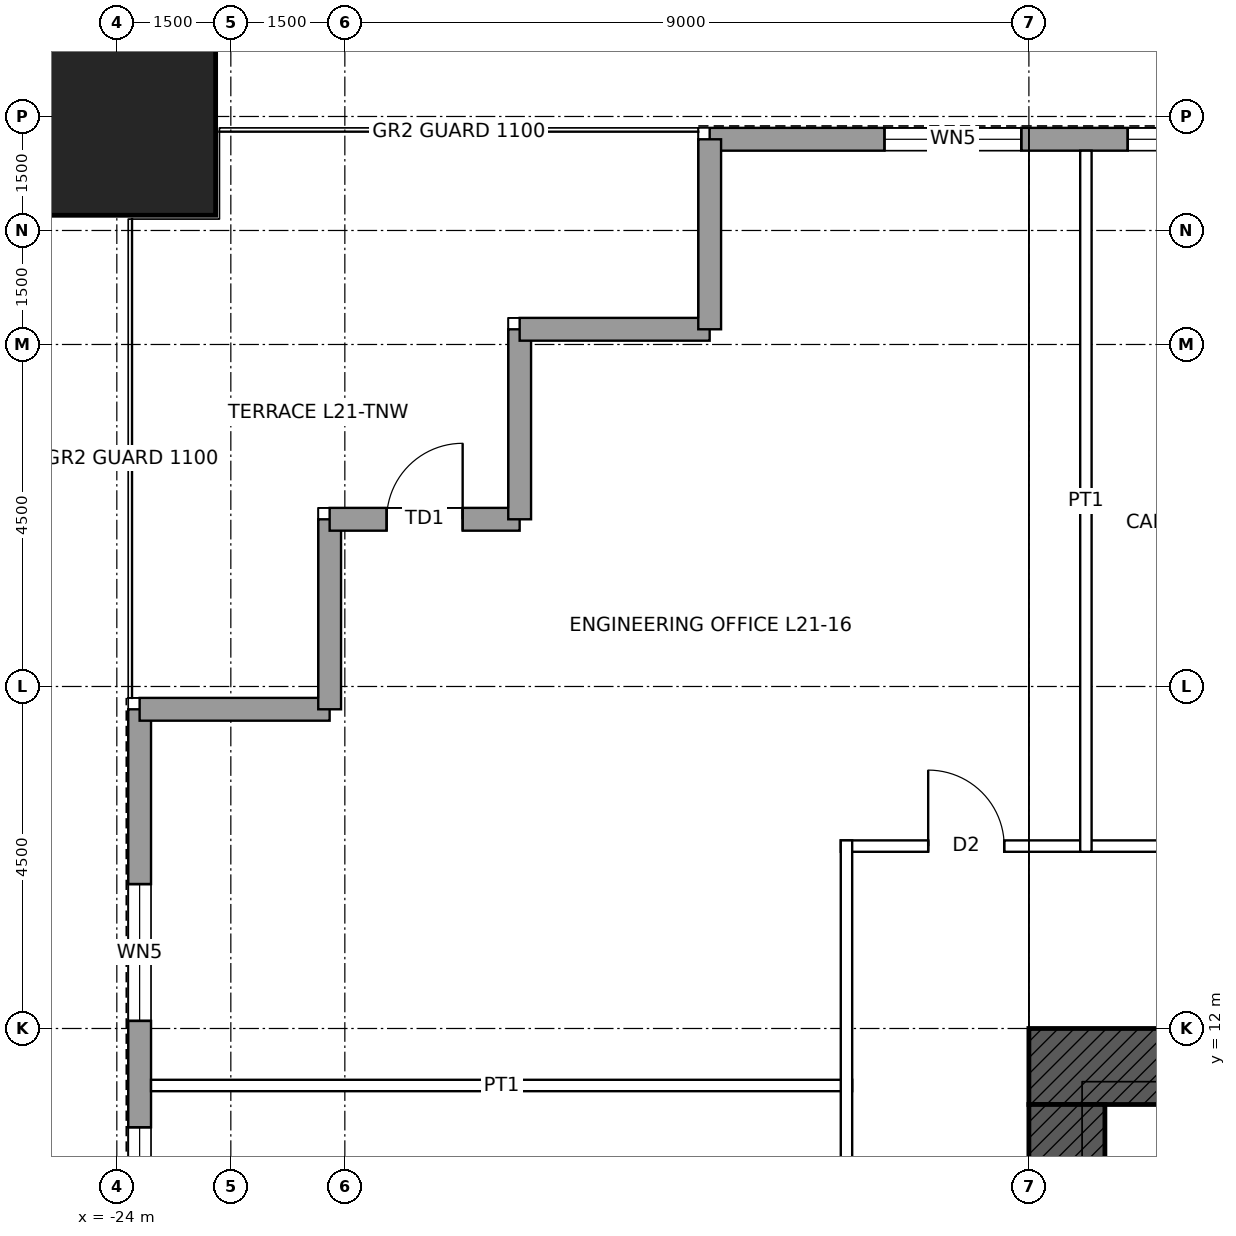
"""IFC4 building model, lengths in metres.
Left out: names, types, materials, properties, quantities, classifications, styles, units other than length and angle.
Written with IfcOpenShell. Run it as: python <this file> out.ifc"""

import sys

from ifc_helpers import new_model, si_unit, direction, frame, frame_2d, origin, origin_2d, place, context, subcontext, project, spatial, rectangle, hollow_rectangle, extrude, element, fill, save


model = new_model("IFC4")
c1 = context("Model", 3, precision=1e-05, world=origin(), true_north=direction((0.0, 1.0)))
c2 = subcontext(c1, "Body", "Model", "MODEL_VIEW")
j1 = project(units=[si_unit("LENGTHUNIT", "METRE"), si_unit("PLANEANGLEUNIT", "RADIAN")], contexts=[c1])
p1 = place(None, origin())
s1 = spatial("IfcSite", under=j1, at=p1, CompositionType="ELEMENT")
p2 = place(p1, origin())
s2 = spatial("IfcBuilding", under=s1, at=p2, CompositionType="ELEMENT")
p3 = place(p2, frame((0.0, 0.0, 108.9)))
s3 = spatial("IfcBuildingStorey", under=s2, at=p3, CompositionType="ELEMENT", Elevation=108.9)
p4 = place(p3, frame((-24.0, 24.0, 0.0), z_axis=(0.0, 0.0, 1.0), x_axis=(1.0, 0.0, 0.0)))
e1 = element("IfcColumn", 1, at=p4, inside=s3, PredefinedType="COLUMN", context=c2, shape_type="SweptSolid", body=[
    extrude(hollow_rectangle(XDim=2.6, YDim=2.6, WallThickness=0.13, at=origin_2d()), origin(), (0.0, 0.0, 1.0), 4.5),
])
p5 = place(p3, frame((-12.0, 11.5, 0.0), z_axis=(0.0, 0.0, 1.0), x_axis=(1.0, 0.0, 0.0)))
e2 = element("IfcWall", 2, at=p5, inside=s3, PredefinedType="SHEAR", context=c2, shape_type="SweptSolid", body=[
    extrude(rectangle(XDim=24.0, YDim=1.0, at=frame_2d((12.0, 0.0))), origin(), (0.0, 0.0, 1.0), 4.5),
])
p6 = place(p5, frame((6.25, 0.0, 0.0)))
e3 = element("IfcOpeningElement", 3, at=p6, cuts=e2, PredefinedType="OPENING", context=c2, shape_type="SweptSolid", body=[
    extrude(rectangle(XDim=1.0, YDim=2.4, at=frame_2d((0.5, 1.2))), frame((0.0, 0.51, 0.0), z_axis=(0.0, -1.0, 0.0), x_axis=(1.0, 0.0, 0.0)), (0.0, 0.0, 1.0), 1.02),
])
p7 = place(p5, frame((16.75, 0.0, 0.0)))
e4 = element("IfcOpeningElement", 4, at=p7, cuts=e2, PredefinedType="OPENING", context=c2, shape_type="SweptSolid", body=[
    extrude(rectangle(XDim=1.0, YDim=2.4, at=frame_2d((0.5, 1.2))), frame((0.0, 0.51, 0.0), z_axis=(0.0, -1.0, 0.0), x_axis=(1.0, 0.0, 0.0)), (0.0, 0.0, 1.0), 1.02),
])
p8 = place(p3, frame((-11.5, -11.0, 0.0), z_axis=(0.0, 0.0, 1.0), x_axis=(0.0, 1.0, 0.0)))
e5 = element("IfcWall", 5, at=p8, inside=s3, PredefinedType="SHEAR", context=c2, shape_type="SweptSolid", body=[
    extrude(rectangle(XDim=22.0, YDim=1.0, at=frame_2d((11.0, 0.0))), origin(), (0.0, 0.0, 1.0), 4.5),
])
p9 = place(p8, frame((10.5, 0.0, 0.0)))
e6 = element("IfcOpeningElement", 6, at=p9, cuts=e5, PredefinedType="OPENING", context=c2, shape_type="SweptSolid", body=[
    extrude(rectangle(XDim=1.0, YDim=2.4, at=frame_2d((0.5, 1.2))), frame((0.0, 0.51, 0.0), z_axis=(0.0, -1.0, 0.0), x_axis=(1.0, 0.0, 0.0)), (0.0, 0.0, 1.0), 1.02),
])
p10 = place(p3, frame((-16.2, 23.7, 0.0), z_axis=(0.0, 0.0, 1.0), x_axis=(1.0, 0.0, 0.0)))
e7 = element("IfcWall", 7, at=p10, inside=s3, PredefinedType="SOLIDWALL", context=c2, shape_type="SweptSolid", body=[
    extrude(rectangle(XDim=32.4, YDim=0.3, at=frame_2d((16.2, 0.0))), origin(), (0.0, 0.0, 1.0), 4.3),
])
p11 = place(p10, frame((2.3, 0.0, 1.0)))
e8 = element("IfcOpeningElement", 8, at=p11, cuts=e7, PredefinedType="OPENING", context=c2, shape_type="SweptSolid", body=[
    extrude(rectangle(XDim=1.8, YDim=1.2, at=frame_2d((0.9, 0.6))), frame((0.0, 0.16, 0.0), z_axis=(0.0, -1.0, 0.0), x_axis=(1.0, 0.0, 0.0)), (0.0, 0.0, 1.0), 0.32),
])
p12 = place(p10, frame((5.5, 0.0, 1.0)))
e9 = element("IfcOpeningElement", 9, at=p12, cuts=e7, PredefinedType="OPENING", context=c2, shape_type="SweptSolid", body=[
    extrude(rectangle(XDim=2.4, YDim=1.2, at=frame_2d((1.2, 0.6))), frame((0.0, 0.16, 0.0), z_axis=(0.0, -1.0, 0.0), x_axis=(1.0, 0.0, 0.0)), (0.0, 0.0, 1.0), 0.32),
])
p13 = place(p10, frame((9.5, 0.0, 1.0)))
e10 = element("IfcOpeningElement", 10, at=p13, cuts=e7, PredefinedType="OPENING", context=c2, shape_type="SweptSolid", body=[
    extrude(rectangle(XDim=2.4, YDim=1.2, at=frame_2d((1.2, 0.6))), frame((0.0, 0.16, 0.0), z_axis=(0.0, -1.0, 0.0), x_axis=(1.0, 0.0, 0.0)), (0.0, 0.0, 1.0), 0.32),
])
p14 = place(p10, frame((13.0, 0.0, 1.0)))
e11 = element("IfcOpeningElement", 11, at=p14, cuts=e7, PredefinedType="OPENING", context=c2, shape_type="SweptSolid", body=[
    extrude(rectangle(XDim=2.4, YDim=1.2, at=frame_2d((1.2, 0.6))), frame((0.0, 0.16, 0.0), z_axis=(0.0, -1.0, 0.0), x_axis=(1.0, 0.0, 0.0)), (0.0, 0.0, 1.0), 0.32),
])
p15 = place(p10, frame((17.0, 0.0, 1.0)))
e12 = element("IfcOpeningElement", 12, at=p15, cuts=e7, PredefinedType="OPENING", context=c2, shape_type="SweptSolid", body=[
    extrude(rectangle(XDim=2.4, YDim=1.2, at=frame_2d((1.2, 0.6))), frame((0.0, 0.16, 0.0), z_axis=(0.0, -1.0, 0.0), x_axis=(1.0, 0.0, 0.0)), (0.0, 0.0, 1.0), 0.32),
])
p16 = place(p10, frame((20.5, 0.0, 1.0)))
e13 = element("IfcOpeningElement", 13, at=p16, cuts=e7, PredefinedType="OPENING", context=c2, shape_type="SweptSolid", body=[
    extrude(rectangle(XDim=2.4, YDim=1.2, at=frame_2d((1.2, 0.6))), frame((0.0, 0.16, 0.0), z_axis=(0.0, -1.0, 0.0), x_axis=(1.0, 0.0, 0.0)), (0.0, 0.0, 1.0), 0.32),
])
p17 = place(p10, frame((24.5, 0.0, 1.0)))
e14 = element("IfcOpeningElement", 14, at=p17, cuts=e7, PredefinedType="OPENING", context=c2, shape_type="SweptSolid", body=[
    extrude(rectangle(XDim=2.4, YDim=1.2, at=frame_2d((1.2, 0.6))), frame((0.0, 0.16, 0.0), z_axis=(0.0, -1.0, 0.0), x_axis=(1.0, 0.0, 0.0)), (0.0, 0.0, 1.0), 0.32),
])
p18 = place(p10, frame((28.3, 0.0, 1.0)))
e15 = element("IfcOpeningElement", 15, at=p18, cuts=e7, PredefinedType="OPENING", context=c2, shape_type="SweptSolid", body=[
    extrude(rectangle(XDim=1.8, YDim=1.2, at=frame_2d((0.9, 0.6))), frame((0.0, 0.16, 0.0), z_axis=(0.0, -1.0, 0.0), x_axis=(1.0, 0.0, 0.0)), (0.0, 0.0, 1.0), 0.32),
])
p19 = place(p3, frame((-23.7, -16.2, 0.0), z_axis=(0.0, 0.0, 1.0), x_axis=(0.0, 1.0, 0.0)))
e16 = element("IfcWall", 16, at=p19, inside=s3, PredefinedType="SOLIDWALL", context=c2, shape_type="SweptSolid", body=[
    extrude(rectangle(XDim=32.4, YDim=0.3, at=frame_2d((16.2, 0.0))), origin(), (0.0, 0.0, 1.0), 4.3),
])
p20 = place(p19, frame((2.3, 0.0, 1.0)))
e17 = element("IfcOpeningElement", 17, at=p20, cuts=e16, PredefinedType="OPENING", context=c2, shape_type="SweptSolid", body=[
    extrude(rectangle(XDim=1.8, YDim=1.2, at=frame_2d((0.9, 0.6))), frame((0.0, 0.16, 0.0), z_axis=(0.0, -1.0, 0.0), x_axis=(1.0, 0.0, 0.0)), (0.0, 0.0, 1.0), 0.32),
])
p21 = place(p19, frame((5.5, 0.0, 1.0)))
e18 = element("IfcOpeningElement", 18, at=p21, cuts=e16, PredefinedType="OPENING", context=c2, shape_type="SweptSolid", body=[
    extrude(rectangle(XDim=2.4, YDim=1.2, at=frame_2d((1.2, 0.6))), frame((0.0, 0.16, 0.0), z_axis=(0.0, -1.0, 0.0), x_axis=(1.0, 0.0, 0.0)), (0.0, 0.0, 1.0), 0.32),
])
p22 = place(p19, frame((9.5, 0.0, 1.0)))
e19 = element("IfcOpeningElement", 19, at=p22, cuts=e16, PredefinedType="OPENING", context=c2, shape_type="SweptSolid", body=[
    extrude(rectangle(XDim=2.4, YDim=1.2, at=frame_2d((1.2, 0.6))), frame((0.0, 0.16, 0.0), z_axis=(0.0, -1.0, 0.0), x_axis=(1.0, 0.0, 0.0)), (0.0, 0.0, 1.0), 0.32),
])
p23 = place(p19, frame((13.0, 0.0, 1.0)))
e20 = element("IfcOpeningElement", 20, at=p23, cuts=e16, PredefinedType="OPENING", context=c2, shape_type="SweptSolid", body=[
    extrude(rectangle(XDim=2.4, YDim=1.2, at=frame_2d((1.2, 0.6))), frame((0.0, 0.16, 0.0), z_axis=(0.0, -1.0, 0.0), x_axis=(1.0, 0.0, 0.0)), (0.0, 0.0, 1.0), 0.32),
])
p24 = place(p19, frame((17.0, 0.0, 1.0)))
e21 = element("IfcOpeningElement", 21, at=p24, cuts=e16, PredefinedType="OPENING", context=c2, shape_type="SweptSolid", body=[
    extrude(rectangle(XDim=2.4, YDim=1.2, at=frame_2d((1.2, 0.6))), frame((0.0, 0.16, 0.0), z_axis=(0.0, -1.0, 0.0), x_axis=(1.0, 0.0, 0.0)), (0.0, 0.0, 1.0), 0.32),
])
p25 = place(p19, frame((20.5, 0.0, 1.0)))
e22 = element("IfcOpeningElement", 22, at=p25, cuts=e16, PredefinedType="OPENING", context=c2, shape_type="SweptSolid", body=[
    extrude(rectangle(XDim=2.4, YDim=1.2, at=frame_2d((1.2, 0.6))), frame((0.0, 0.16, 0.0), z_axis=(0.0, -1.0, 0.0), x_axis=(1.0, 0.0, 0.0)), (0.0, 0.0, 1.0), 0.32),
])
p26 = place(p19, frame((24.5, 0.0, 1.0)))
e23 = element("IfcOpeningElement", 23, at=p26, cuts=e16, PredefinedType="OPENING", context=c2, shape_type="SweptSolid", body=[
    extrude(rectangle(XDim=2.4, YDim=1.2, at=frame_2d((1.2, 0.6))), frame((0.0, 0.16, 0.0), z_axis=(0.0, -1.0, 0.0), x_axis=(1.0, 0.0, 0.0)), (0.0, 0.0, 1.0), 0.32),
])
p27 = place(p19, frame((28.3, 0.0, 1.0)))
e24 = element("IfcOpeningElement", 24, at=p27, cuts=e16, PredefinedType="OPENING", context=c2, shape_type="SweptSolid", body=[
    extrude(rectangle(XDim=1.8, YDim=1.2, at=frame_2d((0.9, 0.6))), frame((0.0, 0.16, 0.0), z_axis=(0.0, -1.0, 0.0), x_axis=(1.0, 0.0, 0.0)), (0.0, 0.0, 1.0), 0.32),
])
for number, where, z_axis, x_axis in (
    (25, (-23.7, 16.2, 0.0), (0.0, 0.0, 1.0), (1.0, 0.0, 0.0)),
    (26, (-21.2, 16.2, 0.0), (0.0, 0.0, 1.0), (0.0, 1.0, 0.0)),
):
    element("IfcWall", number, at=place(p3, frame(where, z_axis=z_axis, x_axis=x_axis)), inside=s3, PredefinedType="SOLIDWALL", context=c2, shape_type="SweptSolid", body=[
        extrude(rectangle(XDim=2.5, YDim=0.3, at=frame_2d((1.25, 0.0))), origin(), (0.0, 0.0, 1.0), 4.3),
    ])
p28 = place(p3, frame((-21.2, 18.7, 0.0), z_axis=(0.0, 0.0, 1.0), x_axis=(1.0, 0.0, 0.0)))
e27 = element("IfcWall", 27, at=p28, inside=s3, PredefinedType="SOLIDWALL", context=c2, shape_type="SweptSolid", body=[
    extrude(rectangle(XDim=2.5, YDim=0.3, at=frame_2d((1.25, 0.0))), origin(), (0.0, 0.0, 1.0), 4.3),
])
p29 = place(p28, frame((0.75, 0.0, 0.0)))
e28 = element("IfcOpeningElement", 28, at=p29, cuts=e27, PredefinedType="OPENING", context=c2, shape_type="SweptSolid", body=[
    extrude(rectangle(XDim=1.0, YDim=2.4, at=frame_2d((0.5, 1.2))), frame((0.0, 0.16, 0.0), z_axis=(0.0, -1.0, 0.0), x_axis=(1.0, 0.0, 0.0)), (0.0, 0.0, 1.0), 0.32),
])
for number, where, z_axis, x_axis in (
    (29, (-18.7, 18.7, 0.0), (0.0, 0.0, 1.0), (0.0, 1.0, 0.0)),
    (30, (-18.7, 21.2, 0.0), (0.0, 0.0, 1.0), (1.0, 0.0, 0.0)),
    (31, (-16.2, 21.2, 0.0), (0.0, 0.0, 1.0), (0.0, 1.0, 0.0)),
):
    element("IfcWall", number, at=place(p3, frame(where, z_axis=z_axis, x_axis=x_axis)), inside=s3, PredefinedType="SOLIDWALL", context=c2, shape_type="SweptSolid", body=[
        extrude(rectangle(XDim=2.5, YDim=0.3, at=frame_2d((1.25, 0.0))), origin(), (0.0, 0.0, 1.0), 4.3),
    ])
p30 = place(p3, frame((-23.55, 11.25, 0.0), z_axis=(0.0, 0.0, 1.0), x_axis=(1.0, 0.0, 0.0)))
e32 = element("IfcWall", 32, at=p30, inside=s3, PredefinedType="PARTITIONING", context=c2, shape_type="SweptSolid", body=[
    extrude(rectangle(XDim=9.225, YDim=0.15, at=frame_2d((4.613, 0.0))), origin(), (0.0, 0.0, 1.0), 3.431),
])
p31 = place(p3, frame((-14.475, 14.4, 0.0), z_axis=(0.0, 0.0, 1.0), x_axis=(1.0, 0.0, 0.0)))
e33 = element("IfcWall", 33, at=p31, inside=s3, PredefinedType="PARTITIONING", context=c2, shape_type="SweptSolid", body=[
    extrude(rectangle(XDim=28.95, YDim=0.15, at=frame_2d((14.475, 0.0))), origin(), (0.0, 0.0, 1.0), 4.3),
])
p32 = place(p31, frame((4.2, 0.0, 0.0)))
e34 = element("IfcOpeningElement", 34, at=p32, cuts=e33, PredefinedType="OPENING", context=c2, shape_type="SweptSolid", body=[
    extrude(rectangle(XDim=1.8, YDim=2.4, at=frame_2d((0.9, 1.2))), frame((0.0, 0.085, 0.0), z_axis=(0.0, -1.0, 0.0), x_axis=(1.0, 0.0, 0.0)), (0.0, 0.0, 1.0), 0.17),
])
p33 = place(p31, frame((9.825, 0.0, 0.0)))
e35 = element("IfcOpeningElement", 35, at=p33, cuts=e33, PredefinedType="OPENING", context=c2, shape_type="SweptSolid", body=[
    extrude(rectangle(XDim=1.8, YDim=2.4, at=frame_2d((0.9, 1.2))), frame((0.0, 0.085, 0.0), z_axis=(0.0, -1.0, 0.0), x_axis=(1.0, 0.0, 0.0)), (0.0, 0.0, 1.0), 0.17),
])
p34 = place(p31, frame((17.325, 0.0, 0.0)))
e36 = element("IfcOpeningElement", 36, at=p34, cuts=e33, PredefinedType="OPENING", context=c2, shape_type="SweptSolid", body=[
    extrude(rectangle(XDim=1.8, YDim=2.4, at=frame_2d((0.9, 1.2))), frame((0.0, 0.085, 0.0), z_axis=(0.0, -1.0, 0.0), x_axis=(1.0, 0.0, 0.0)), (0.0, 0.0, 1.0), 0.17),
])
p35 = place(p31, frame((22.95, 0.0, 0.0)))
e37 = element("IfcOpeningElement", 37, at=p35, cuts=e33, PredefinedType="OPENING", context=c2, shape_type="SweptSolid", body=[
    extrude(rectangle(XDim=1.8, YDim=2.4, at=frame_2d((0.9, 1.2))), frame((0.0, 0.085, 0.0), z_axis=(0.0, -1.0, 0.0), x_axis=(1.0, 0.0, 0.0)), (0.0, 0.0, 1.0), 0.17),
])
p36 = place(p31, frame((26.8, 0.0, 0.0)))
e38 = element("IfcOpeningElement", 38, at=p36, cuts=e33, PredefinedType="OPENING", context=c2, shape_type="SweptSolid", body=[
    extrude(rectangle(XDim=1.0, YDim=2.1, at=frame_2d((0.5, 1.05))), frame((0.0, 0.085, 0.0), z_axis=(0.0, -1.0, 0.0), x_axis=(1.0, 0.0, 0.0)), (0.0, 0.0, 1.0), 0.17),
])
p37 = place(p31, frame((1.15, 0.0, 0.0)))
e39 = element("IfcOpeningElement", 39, at=p37, cuts=e33, PredefinedType="OPENING", context=c2, shape_type="SweptSolid", body=[
    extrude(rectangle(XDim=1.0, YDim=2.1, at=frame_2d((0.5, 1.05))), frame((0.0, 0.085, 0.0), z_axis=(0.0, -1.0, 0.0), x_axis=(1.0, 0.0, 0.0)), (0.0, 0.0, 1.0), 0.17),
])
p38 = place(p3, frame((-14.4, -14.475, 0.0), z_axis=(0.0, 0.0, 1.0), x_axis=(0.0, 1.0, 0.0)))
e40 = element("IfcWall", 40, at=p38, inside=s3, PredefinedType="PARTITIONING", context=c2, shape_type="SweptSolid", body=[
    extrude(rectangle(XDim=28.95, YDim=0.15, at=frame_2d((14.475, 0.0))), origin(), (0.0, 0.0, 1.0), 4.3),
])
p39 = place(p38, frame((6.075, 0.0, 0.0)))
e41 = element("IfcOpeningElement", 41, at=p39, cuts=e40, PredefinedType="OPENING", context=c2, shape_type="SweptSolid", body=[
    extrude(rectangle(XDim=1.8, YDim=2.4, at=frame_2d((0.9, 1.2))), frame((0.0, 0.085, 0.0), z_axis=(0.0, -1.0, 0.0), x_axis=(1.0, 0.0, 0.0)), (0.0, 0.0, 1.0), 0.17),
])
p40 = place(p38, frame((17.325, 0.0, 0.0)))
e42 = element("IfcOpeningElement", 42, at=p40, cuts=e40, PredefinedType="OPENING", context=c2, shape_type="SweptSolid", body=[
    extrude(rectangle(XDim=1.8, YDim=2.4, at=frame_2d((0.9, 1.2))), frame((0.0, 0.085, 0.0), z_axis=(0.0, -1.0, 0.0), x_axis=(1.0, 0.0, 0.0)), (0.0, 0.0, 1.0), 0.17),
])
p41 = place(p3, frame((-11.25, 14.325, 0.0), z_axis=(0.0, 0.0, 1.0), x_axis=(0.0, 1.0, 0.0)))
e43 = element("IfcWall", 43, at=p41, inside=s3, PredefinedType="PARTITIONING", context=c2, shape_type="SweptSolid", body=[
    extrude(rectangle(XDim=9.225, YDim=0.15, at=frame_2d((4.613, 0.0))), origin(), (0.0, 0.0, 1.0), 3.431),
])
p42 = place(p11, origin())
e44 = element("IfcWindow", 44, at=p42, inside=s3, PartitioningType="SINGLE_PANEL", PredefinedType="WINDOW", context=c2, shape_type="SweptSolid", body=[
    extrude(rectangle(XDim=1.8, YDim=1.2, at=frame_2d((0.9, 0.6))), frame((0.0, 0.03, 0.0), z_axis=(0.0, -1.0, 0.0), x_axis=(1.0, 0.0, 0.0)), (0.0, 0.0, 1.0), 0.06),
])
fill(e8, e44)
p43 = place(p12, origin())
e45 = element("IfcWindow", 45, at=p43, inside=s3, PartitioningType="SINGLE_PANEL", PredefinedType="WINDOW", context=c2, shape_type="SweptSolid", body=[
    extrude(rectangle(XDim=2.4, YDim=1.2, at=frame_2d((1.2, 0.6))), frame((0.0, 0.03, 0.0), z_axis=(0.0, -1.0, 0.0), x_axis=(1.0, 0.0, 0.0)), (0.0, 0.0, 1.0), 0.06),
])
fill(e9, e45)
p44 = place(p26, origin())
e46 = element("IfcWindow", 46, at=p44, inside=s3, PartitioningType="SINGLE_PANEL", PredefinedType="WINDOW", context=c2, shape_type="SweptSolid", body=[
    extrude(rectangle(XDim=2.4, YDim=1.2, at=frame_2d((1.2, 0.6))), frame((0.0, 0.03, 0.0), z_axis=(0.0, -1.0, 0.0), x_axis=(1.0, 0.0, 0.0)), (0.0, 0.0, 1.0), 0.06),
])
fill(e23, e46)
p45 = place(p27, origin())
e47 = element("IfcWindow", 47, at=p45, inside=s3, PartitioningType="SINGLE_PANEL", PredefinedType="WINDOW", context=c2, shape_type="SweptSolid", body=[
    extrude(rectangle(XDim=1.8, YDim=1.2, at=frame_2d((0.9, 0.6))), frame((0.0, 0.03, 0.0), z_axis=(0.0, -1.0, 0.0), x_axis=(1.0, 0.0, 0.0)), (0.0, 0.0, 1.0), 0.06),
])
fill(e24, e47)
p46 = place(p29, origin())
e48 = element("IfcDoor", 48, at=p46, inside=s3, OperationType="SINGLE_SWING_RIGHT", PredefinedType="DOOR", context=c2, shape_type="SweptSolid", body=[
    extrude(rectangle(XDim=1.0, YDim=2.4, at=frame_2d((0.5, 1.2))), frame((0.0, 0.025, 0.0), z_axis=(0.0, -1.0, 0.0), x_axis=(1.0, 0.0, 0.0)), (0.0, 0.0, 1.0), 0.05),
])
fill(e28, e48)
p47 = place(p37, origin())
e49 = element("IfcDoor", 49, at=p47, inside=s3, OperationType="SINGLE_SWING_LEFT", PredefinedType="DOOR", context=c2, shape_type="SweptSolid", body=[
    extrude(rectangle(XDim=1.0, YDim=2.1, at=frame_2d((0.5, 1.05))), frame((0.0, 0.025, 0.0), z_axis=(0.0, -1.0, 0.0), x_axis=(1.0, 0.0, 0.0)), (0.0, 0.0, 1.0), 0.05),
])
fill(e39, e49)
save(model, sys.argv[1])
